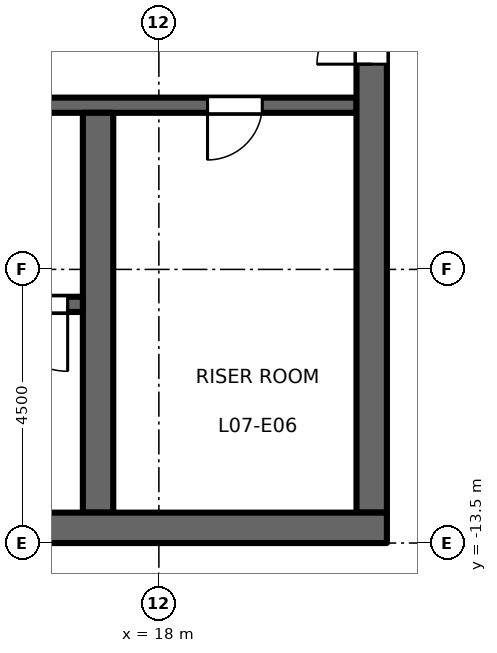
"""IFC4 building model, lengths in metres.
Left out: names, types, materials, properties, quantities, classifications, styles, units other than length and angle.
Written with IfcOpenShell. Run it as: python <this file> out.ifc"""

import sys

from ifc_helpers import new_model, si_unit, direction, frame, frame_2d, origin, place, context, subcontext, project, spatial, rectangle, extrude, element, fill, save


model = new_model("IFC4")
c1 = context("Model", 3, precision=1e-05, world=origin(), true_north=direction((0.0, 1.0)))
c2 = subcontext(c1, "Body", "Model", "MODEL_VIEW")
j1 = project(units=[si_unit("LENGTHUNIT", "METRE"), si_unit("PLANEANGLEUNIT", "RADIAN")], contexts=[c1])
p1 = place(None, origin())
s1 = spatial("IfcSite", under=j1, at=p1, CompositionType="ELEMENT")
p2 = place(p1, origin())
s2 = spatial("IfcBuilding", under=s1, at=p2, CompositionType="ELEMENT")
p3 = place(p2, frame((0.0, 0.0, 35.7)))
s3 = spatial("IfcBuildingStorey", under=s2, at=p3, CompositionType="ELEMENT", Elevation=35.7)
p4 = place(p3, frame((12.15, -6.3, 0.0), z_axis=(0.0, 0.0, 1.0), x_axis=(1.0, 0.0, 0.0)))
e1 = element("IfcWall", 1, at=p4, inside=s3, PredefinedType="SHEAR", context=c2, shape_type="SweptSolid", body=[
    extrude(rectangle(XDim=9.1, YDim=0.25, at=frame_2d((4.55, 0.0))), origin(), (0.0, 0.0, 1.0), 4.35),
])
p5 = place(p4, frame((1.8, 0.0, 0.0)))
e2 = element("IfcOpeningElement", 2, at=p5, cuts=e1, PredefinedType="OPENING", context=c2, shape_type="SweptSolid", body=[
    extrude(rectangle(XDim=1.0, YDim=2.1, at=frame_2d((0.5, 1.05))), frame((0.0, 0.135, 0.0), z_axis=(0.0, -1.0, 0.0), x_axis=(1.0, 0.0, 0.0)), (0.0, 0.0, 1.0), 0.27),
])
p6 = place(p4, frame((6.65, 0.0, 0.0)))
e3 = element("IfcOpeningElement", 3, at=p6, cuts=e1, PredefinedType="OPENING", context=c2, shape_type="SweptSolid", body=[
    extrude(rectangle(XDim=0.9, YDim=2.1, at=frame_2d((0.45, 1.05))), frame((0.0, 0.135, 0.0), z_axis=(0.0, -1.0, 0.0), x_axis=(1.0, 0.0, 0.0)), (0.0, 0.0, 1.0), 0.27),
])
p7 = place(p3, frame((21.5, -13.0, 0.0), z_axis=(0.0, 0.0, 1.0), x_axis=(0.0, 1.0, 0.0)))
e4 = element("IfcWall", 4, at=p7, inside=s3, PredefinedType="SHEAR", context=c2, shape_type="SweptSolid", body=[
    extrude(rectangle(XDim=26.0, YDim=0.5, at=frame_2d((13.0, 0.0))), origin(), (0.0, 0.0, 1.0), 4.35),
])
p8 = place(p7, frame((16.825, 0.0, 0.0)))
e5 = element("IfcOpeningElement", 5, at=p8, cuts=e4, PredefinedType="OPENING", context=c2, shape_type="SweptSolid", body=[
    extrude(rectangle(XDim=1.8, YDim=2.1, at=frame_2d((0.9, 1.05))), frame((0.0, 0.26, 0.0), z_axis=(0.0, -1.0, 0.0), x_axis=(1.0, 0.0, 0.0)), (0.0, 0.0, 1.0), 0.52),
])
p9 = place(p7, frame((7.375, 0.0, 0.0)))
e6 = element("IfcOpeningElement", 6, at=p9, cuts=e4, PredefinedType="OPENING", context=c2, shape_type="SweptSolid", body=[
    extrude(rectangle(XDim=1.8, YDim=2.1, at=frame_2d((0.9, 1.05))), frame((0.0, 0.26, 0.0), z_axis=(0.0, -1.0, 0.0), x_axis=(1.0, 0.0, 0.0)), (0.0, 0.0, 1.0), 0.52),
])
p10 = place(p7, frame((23.4, 0.0, 0.0)))
e7 = element("IfcOpeningElement", 7, at=p10, cuts=e4, PredefinedType="OPENING", context=c2, shape_type="SweptSolid", body=[
    extrude(rectangle(XDim=0.9, YDim=2.1, at=frame_2d((0.45, 1.05))), frame((0.0, 0.26, 0.0), z_axis=(0.0, -1.0, 0.0), x_axis=(1.0, 0.0, 0.0)), (0.0, 0.0, 1.0), 0.52),
])
p11 = place(p3, frame((17.0, -13.0, 0.0), z_axis=(0.0, 0.0, 1.0), x_axis=(0.0, 1.0, 0.0)))
e8 = element("IfcWall", 8, at=p11, inside=s3, PredefinedType="SHEAR", context=c2, shape_type="SweptSolid", body=[
    extrude(rectangle(XDim=6.575, YDim=0.5, at=frame_2d((3.288, 0.0))), origin(), (0.0, 0.0, 1.0), 4.35),
])
p12 = place(p3, frame((8.75, -9.575, 0.0), z_axis=(0.0, 0.0, 1.0), x_axis=(1.0, 0.0, 0.0)))
e9 = element("IfcWall", 9, at=p12, inside=s3, PredefinedType="SHEAR", context=c2, shape_type="SweptSolid", body=[
    extrude(rectangle(XDim=8.0, YDim=0.25, at=frame_2d((4.0, 0.0))), origin(), (0.0, 0.0, 1.0), 4.35),
])
p13 = place(p12, frame((6.65, 0.0, 0.0)))
e10 = element("IfcOpeningElement", 10, at=p13, cuts=e9, PredefinedType="OPENING", context=c2, shape_type="SweptSolid", body=[
    extrude(rectangle(XDim=1.1, YDim=2.1, at=frame_2d((0.55, 1.05))), frame((0.0, 0.135, 0.0), z_axis=(0.0, -1.0, 0.0), x_axis=(1.0, 0.0, 0.0)), (0.0, 0.0, 1.0), 0.27),
])
p14 = place(p3, frame((8.25, -13.25, 0.0), z_axis=(0.0, 0.0, 1.0), x_axis=(1.0, 0.0, 0.0)))
e11 = element("IfcWall", 11, at=p14, inside=s3, PredefinedType="SHEAR", context=c2, shape_type="SweptSolid", body=[
    extrude(rectangle(XDim=13.5, YDim=0.5, at=frame_2d((6.75, 0.0))), origin(), (0.0, 0.0, 1.0), 4.35),
])
p15 = place(p13, origin())
e12 = element("IfcDoor", 12, at=p15, inside=s3, OperationType="SINGLE_SWING_RIGHT", PredefinedType="DOOR", context=c2, shape_type="SweptSolid", body=[
    extrude(rectangle(XDim=1.1, YDim=2.1, at=frame_2d((0.55, 1.05))), frame((0.0, 0.025, 0.0), z_axis=(0.0, -1.0, 0.0), x_axis=(1.0, 0.0, 0.0)), (0.0, 0.0, 1.0), 0.05),
])
fill(e10, e12)
p16 = place(p9, origin())
e13 = element("IfcDoor", 13, at=p16, inside=s3, OperationType="DOUBLE_DOOR_DOUBLE_SWING", PredefinedType="DOOR", context=c2, shape_type="SweptSolid", body=[
    extrude(rectangle(XDim=1.8, YDim=2.1, at=frame_2d((0.9, 1.05))), frame((0.0, 0.025, 0.0), z_axis=(0.0, -1.0, 0.0), x_axis=(1.0, 0.0, 0.0)), (0.0, 0.0, 1.0), 0.05),
])
fill(e6, e13)
p17 = place(p6, origin())
e14 = element("IfcDoor", 14, at=p17, inside=s3, OperationType="SINGLE_SWING_LEFT", PredefinedType="DOOR", context=c2, shape_type="SweptSolid", body=[
    extrude(rectangle(XDim=0.9, YDim=2.1, at=frame_2d((0.45, 1.05))), frame((0.0, 0.025, 0.0), z_axis=(0.0, -1.0, 0.0), x_axis=(1.0, 0.0, 0.0)), (0.0, 0.0, 1.0), 0.05),
])
fill(e3, e14)
save(model, sys.argv[1])
